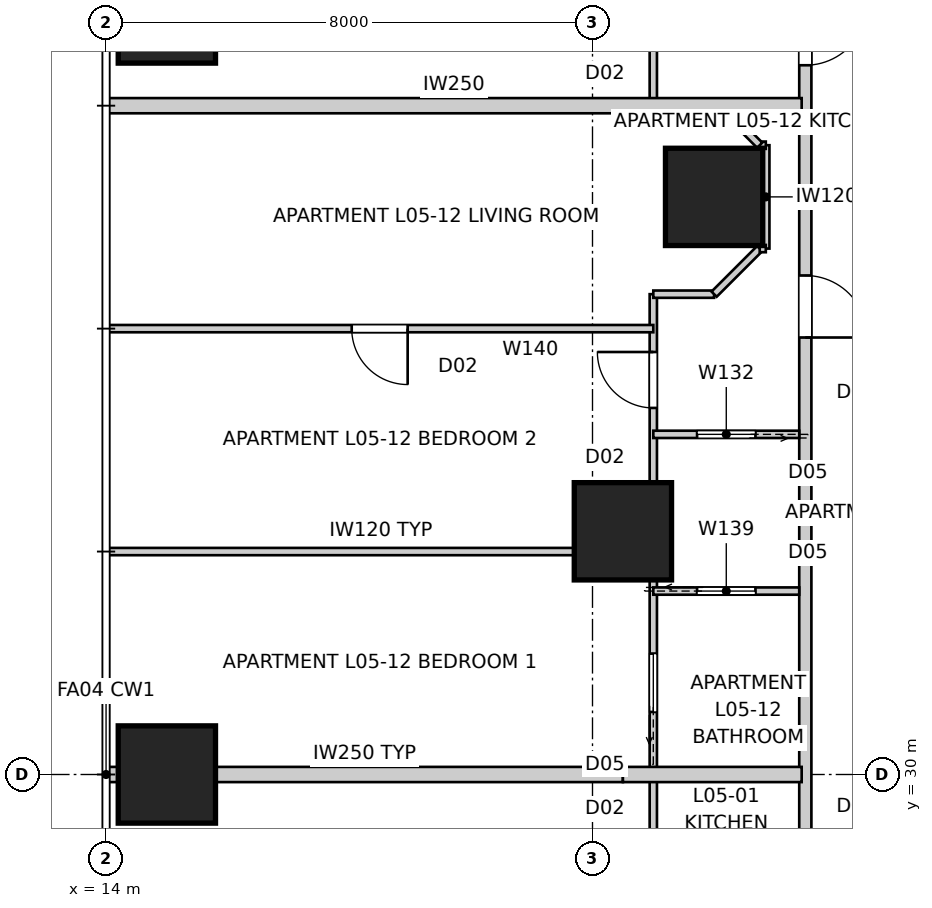
"""IFC4 building model, lengths in metres.
Left out: names, types, materials, properties, quantities, classifications, styles, units other than length and angle.
Written with IfcOpenShell. Run it as: python <this file> out.ifc"""

import sys

from ifc_helpers import new_model, si_unit, direction, frame, frame_2d, origin, origin_2d, place, context, subcontext, project, spatial, rectangle, extrude, element, fill, save


model = new_model("IFC4")
c1 = context("Model", 3, precision=1e-05, world=origin(), true_north=direction((0.0, 1.0)))
c2 = subcontext(c1, "Body", "Model", "MODEL_VIEW")
j1 = project(units=[si_unit("LENGTHUNIT", "METRE"), si_unit("PLANEANGLEUNIT", "RADIAN")], contexts=[c1])
p1 = place(None, origin())
s1 = spatial("IfcSite", under=j1, at=p1, CompositionType="ELEMENT")
p2 = place(p1, origin())
s2 = spatial("IfcBuilding", under=s1, at=p2, CompositionType="ELEMENT")
p3 = place(p2, frame((0.0, 0.0, 21.8)))
s3 = spatial("IfcBuildingStorey", under=s2, at=p3, CompositionType="ELEMENT", Elevation=21.8)
for number, where, z_axis, x_axis in (
    (1, (15.0, 42.5, 0.0), (0.0, 0.0, 1.0), (1.0, 0.0, 0.0)),
    (2, (15.0, 30.0, 0.0), (0.0, 0.0, 1.0), (1.0, 0.0, 0.0)),
    (3, (24.0, 39.5, 0.0), (0.0, 0.0, 1.0), (1.0, 0.0, 0.0)),
    (4, (22.5, 34.0, 0.0), (0.0, 0.0, 1.0), (1.0, 0.0, 0.0)),
):
    element("IfcColumn", number, at=place(p3, frame(where, z_axis=z_axis, x_axis=x_axis)), inside=s3, PredefinedType="COLUMN", context=c2, shape_type="SweptSolid", body=[
        extrude(rectangle(XDim=1.6, YDim=1.6, at=origin_2d()), origin(), (0.0, 0.0, 1.0), 3.4),
    ])
p4 = place(p3, frame((25.5, 43.7, 0.0), z_axis=(0.0, 0.0, 1.0), x_axis=(0.0, -1.0, 0.0)))
e5 = element("IfcWall", 5, at=p4, inside=s3, PredefinedType="PARTITIONING", context=c2, shape_type="SweptSolid", body=[
    extrude(rectangle(XDim=27.4, YDim=0.2, at=frame_2d((13.7, 0.0))), origin(), (0.0, 0.0, 1.0), 3.25),
])
p5 = place(p4, frame((5.493, 0.0, 0.0)))
e6 = element("IfcOpeningElement", 6, at=p5, cuts=e5, PredefinedType="OPENING", context=c2, shape_type="SweptSolid", body=[
    extrude(rectangle(XDim=1.02, YDim=2.34, at=frame_2d((0.51, 1.17))), frame((0.0, 0.11, 0.0), z_axis=(0.0, -1.0, 0.0), x_axis=(1.0, 0.0, 0.0)), (0.0, 0.0, 1.0), 0.22),
])
p6 = place(p4, frame((15.16, 0.0, 0.0)))
e7 = element("IfcOpeningElement", 7, at=p6, cuts=e5, PredefinedType="OPENING", context=c2, shape_type="SweptSolid", body=[
    extrude(rectangle(XDim=1.02, YDim=2.34, at=frame_2d((0.51, 1.17))), frame((0.0, 0.11, 0.0), z_axis=(0.0, -1.0, 0.0), x_axis=(1.0, 0.0, 0.0)), (0.0, 0.0, 1.0), 0.22),
])
p7 = place(p4, frame((25.365, 0.0, 0.0)))
e8 = element("IfcOpeningElement", 8, at=p7, cuts=e5, PredefinedType="OPENING", context=c2, shape_type="SweptSolid", body=[
    extrude(rectangle(XDim=1.02, YDim=2.34, at=frame_2d((0.51, 1.17))), frame((0.0, 0.11, 0.0), z_axis=(0.0, -1.0, 0.0), x_axis=(1.0, 0.0, 0.0)), (0.0, 0.0, 1.0), 0.22),
])
p8 = place(p4, frame((1.015, 0.0, 0.0)))
e9 = element("IfcOpeningElement", 9, at=p8, cuts=e5, PredefinedType="OPENING", context=c2, shape_type="SweptSolid", body=[
    extrude(rectangle(XDim=1.02, YDim=2.34, at=frame_2d((0.51, 1.17))), frame((0.0, 0.11, 0.0), z_axis=(0.0, -1.0, 0.0), x_axis=(1.0, 0.0, 0.0)), (0.0, 0.0, 1.0), 0.22),
])
p9 = place(p3, frame((14.0, 41.0, 0.0), z_axis=(0.0, 0.0, 1.0), x_axis=(1.0, 0.0, 0.0)))
e10 = element("IfcWall", 10, at=p9, inside=s3, PredefinedType="PARTITIONING", context=c2, shape_type="SweptSolid", body=[
    extrude(rectangle(XDim=11.44, YDim=0.25, at=frame_2d((5.72, 0.0))), origin(), (0.0, 0.0, 1.0), 3.25),
])
p10 = place(p3, frame((14.0, 30.0, 0.0), z_axis=(0.0, 0.0, 1.0), x_axis=(1.0, 0.0, 0.0)))
e11 = element("IfcWall", 11, at=p10, inside=s3, PredefinedType="PARTITIONING", context=c2, shape_type="SweptSolid", body=[
    extrude(rectangle(XDim=8.5, YDim=0.25, at=frame_2d((4.25, 0.0))), origin(), (0.0, 0.0, 1.0), 3.25),
])
p11 = place(p3, frame((22.5, 30.0, 0.0), z_axis=(0.0, 0.0, 1.0), x_axis=(1.0, 0.0, 0.0)))
e12 = element("IfcWall", 12, at=p11, inside=s3, PredefinedType="PARTITIONING", context=c2, shape_type="SweptSolid", body=[
    extrude(rectangle(XDim=2.94, YDim=0.25, at=frame_2d((1.47, 0.0))), origin(), (0.0, 0.0, 1.0), 2.796),
])
p12 = place(p3, frame((23.0, 22.667, 0.0), z_axis=(0.0, 0.0, 1.0), x_axis=(0.0, 1.0, 0.0)))
e13 = element("IfcWall", 13, at=p12, inside=s3, PredefinedType="PARTITIONING", context=c2, shape_type="SweptSolid", body=[
    extrude(rectangle(XDim=15.233, YDim=0.12, at=frame_2d((7.617, 0.0))), origin(), (0.0, 0.0, 1.0), 2.549),
])
p13 = place(p12, frame((13.362, 0.0, 0.0)))
e14 = element("IfcOpeningElement", 14, at=p13, cuts=e13, PredefinedType="OPENING", context=c2, shape_type="SweptSolid", body=[
    extrude(rectangle(XDim=0.92, YDim=2.34, at=frame_2d((0.46, 1.17))), frame((0.0, 0.07, 0.0), z_axis=(0.0, -1.0, 0.0), x_axis=(1.0, 0.0, 0.0)), (0.0, 0.0, 1.0), 0.14),
])
p14 = place(p12, frame((5.015, 0.0, 0.0)))
e15 = element("IfcOpeningElement", 15, at=p14, cuts=e13, PredefinedType="OPENING", context=c2, shape_type="SweptSolid", body=[
    extrude(rectangle(XDim=0.92, YDim=2.34, at=frame_2d((0.46, 1.17))), frame((0.0, 0.07, 0.0), z_axis=(0.0, -1.0, 0.0), x_axis=(1.0, 0.0, 0.0)), (0.0, 0.0, 1.0), 0.14),
])
p15 = place(p12, frame((8.362, 0.0, 0.0)))
e16 = element("IfcOpeningElement", 16, at=p15, cuts=e13, PredefinedType="OPENING", context=c2, shape_type="SweptSolid", body=[
    extrude(rectangle(XDim=0.96, YDim=2.1, at=frame_2d((0.48, 1.05))), frame((0.0, 0.07, 0.0), z_axis=(0.0, -1.0, 0.0), x_axis=(1.0, 0.0, 0.0)), (0.0, 0.0, 1.0), 0.14),
])
p16 = place(p3, frame((23.0, 41.0, 0.0), z_axis=(0.0, 0.0, 1.0), x_axis=(0.0, 1.0, 0.0)))
e17 = element("IfcWall", 17, at=p16, inside=s3, PredefinedType="PARTITIONING", context=c2, shape_type="SweptSolid", body=[
    extrude(rectangle(XDim=6.0, YDim=0.12, at=frame_2d((3.0, 0.0))), origin(), (0.0, 0.0, 1.0), 3.25),
])
p17 = place(p16, frame((1.351, 0.0, 0.0)))
e18 = element("IfcOpeningElement", 18, at=p17, cuts=e17, PredefinedType="OPENING", context=c2, shape_type="SweptSolid", body=[
    extrude(rectangle(XDim=0.92, YDim=2.34, at=frame_2d((0.46, 1.17))), frame((0.0, 0.07, 0.0), z_axis=(0.0, -1.0, 0.0), x_axis=(1.0, 0.0, 0.0)), (0.0, 0.0, 1.0), 0.14),
])
p18 = place(p3, frame((25.4, 35.594, 0.0), z_axis=(0.0, 0.0, 1.0), x_axis=(-1.0, 0.0, 0.0)))
e19 = element("IfcWall", 19, at=p18, inside=s3, PredefinedType="PARTITIONING", context=c2, shape_type="SweptSolid", body=[
    extrude(rectangle(XDim=2.4, YDim=0.12, at=frame_2d((1.2, 0.0))), origin(), (0.0, 0.0, 1.0), 3.25),
])
p19 = place(p18, frame((0.72, 0.0, 0.0)))
e20 = element("IfcOpeningElement", 20, at=p19, cuts=e19, PredefinedType="OPENING", context=c2, shape_type="SweptSolid", body=[
    extrude(rectangle(XDim=0.96, YDim=2.1, at=frame_2d((0.48, 1.05))), frame((0.0, 0.07, 0.0), z_axis=(0.0, -1.0, 0.0), x_axis=(1.0, 0.0, 0.0)), (0.0, 0.0, 1.0), 0.14),
])
p20 = place(p3, frame((23.0, 37.9, 0.0), z_axis=(0.0, 0.0, 1.0), x_axis=(1.0, 0.0, 0.0)))
e21 = element("IfcWall", 21, at=p20, inside=s3, PredefinedType="PARTITIONING", context=c2, shape_type="SweptSolid", body=[
    extrude(rectangle(XDim=1.0, YDim=0.12, at=frame_2d((0.5, 0.0))), origin(), (0.0, 0.0, 1.0), 3.25),
])
p21 = place(p3, frame((24.0, 37.9, 0.0), z_axis=(0.0, 0.0, 1.0), x_axis=(0.707106781187, 0.707106781187, 0.0)))
e22 = element("IfcWall", 22, at=p21, inside=s3, PredefinedType="PARTITIONING", context=c2, shape_type="SweptSolid", body=[
    extrude(rectangle(XDim=1.061, YDim=0.12, at=frame_2d((0.53, 0.0))), origin(), (0.0, 0.0, 1.0), 3.25),
])
p22 = place(p3, frame((24.85, 38.65, 0.0), z_axis=(0.0, 0.0, 1.0), x_axis=(0.0, 1.0, 0.0)))
e23 = element("IfcWall", 23, at=p22, inside=s3, PredefinedType="PARTITIONING", context=c2, shape_type="SweptSolid", body=[
    extrude(rectangle(XDim=1.7, YDim=0.12, at=frame_2d((0.85, 0.0))), origin(), (0.0, 0.0, 1.0), 3.25),
])
p23 = place(p3, frame((24.75, 40.35, 0.0), z_axis=(0.0, 0.0, 1.0), x_axis=(-0.707106781187, 0.707106781187, 0.0)))
e24 = element("IfcWall", 24, at=p23, inside=s3, PredefinedType="PARTITIONING", context=c2, shape_type="SweptSolid", body=[
    extrude(rectangle(XDim=0.919, YDim=0.12, at=frame_2d((0.459, 0.0))), origin(), (0.0, 0.0, 1.0), 3.25),
])
p24 = place(p3, frame((23.0, 33.017, 0.0), z_axis=(0.0, 0.0, 1.0), x_axis=(1.0, 0.0, 0.0)))
e25 = element("IfcWall", 25, at=p24, inside=s3, PredefinedType="PARTITIONING", context=c2, shape_type="SweptSolid", body=[
    extrude(rectangle(XDim=2.4, YDim=0.12, at=frame_2d((1.2, 0.0))), origin(), (0.0, 0.0, 1.0), 3.25),
])
p25 = place(p24, frame((0.72, 0.0, 0.0)))
e26 = element("IfcOpeningElement", 26, at=p25, cuts=e25, PredefinedType="OPENING", context=c2, shape_type="SweptSolid", body=[
    extrude(rectangle(XDim=0.96, YDim=2.1, at=frame_2d((0.48, 1.05))), frame((0.0, 0.07, 0.0), z_axis=(0.0, -1.0, 0.0), x_axis=(1.0, 0.0, 0.0)), (0.0, 0.0, 1.0), 0.14),
])
p26 = place(p3, frame((23.0, 37.333, 0.0), z_axis=(0.0, 0.0, 1.0), x_axis=(-1.0, 0.0, 0.0)))
e27 = element("IfcWall", 27, at=p26, inside=s3, PredefinedType="PARTITIONING", context=c2, shape_type="SweptSolid", body=[
    extrude(rectangle(XDim=8.96, YDim=0.12, at=frame_2d((4.48, 0.0))), origin(), (0.0, 0.0, 1.0), 3.25),
])
p27 = place(p26, frame((4.04, 0.0, 0.0)))
e28 = element("IfcOpeningElement", 28, at=p27, cuts=e27, PredefinedType="OPENING", context=c2, shape_type="SweptSolid", body=[
    extrude(rectangle(XDim=0.92, YDim=2.34, at=frame_2d((0.46, 1.17))), frame((0.0, 0.07, 0.0), z_axis=(0.0, -1.0, 0.0), x_axis=(1.0, 0.0, 0.0)), (0.0, 0.0, 1.0), 0.14),
])
p28 = place(p3, frame((14.04, 33.667, 0.0), z_axis=(0.0, 0.0, 1.0), x_axis=(1.0, 0.0, 0.0)))
e29 = element("IfcWall", 29, at=p28, inside=s3, PredefinedType="PARTITIONING", context=c2, shape_type="SweptSolid", body=[
    extrude(rectangle(XDim=8.96, YDim=0.12, at=frame_2d((4.48, 0.0))), origin(), (0.0, 0.0, 1.0), 3.25),
])
for number, where, z_axis, x_axis in (
    (30, (24.85, 38.65, 0.0), (0.0, 0.0, 1.0), (-1.0, 0.0, 0.0)),
    (31, (24.85, 40.35, 0.0), (0.0, 0.0, 1.0), (-1.0, 0.0, 0.0)),
):
    element("IfcWall", number, at=place(p3, frame(where, z_axis=z_axis, x_axis=x_axis)), inside=s3, PredefinedType="PARTITIONING", context=c2, shape_type="SweptSolid", body=[
        extrude(rectangle(XDim=0.1, YDim=0.12, at=frame_2d((0.05, 0.0))), origin(), (0.0, 0.0, 1.0), 3.25),
    ])
p29 = place(p5, origin())
e32 = element("IfcDoor", 32, at=p29, inside=s3, OperationType="SINGLE_SWING_RIGHT", PredefinedType="DOOR", context=c2, shape_type="SweptSolid", body=[
    extrude(rectangle(XDim=1.02, YDim=2.34, at=frame_2d((0.51, 1.17))), frame((0.0, 0.025, 0.0), z_axis=(0.0, -1.0, 0.0), x_axis=(1.0, 0.0, 0.0)), (0.0, 0.0, 1.0), 0.05),
])
fill(e6, e32)
p30 = place(p8, origin())
e33 = element("IfcDoor", 33, at=p30, inside=s3, OperationType="SINGLE_SWING_LEFT", PredefinedType="DOOR", context=c2, shape_type="SweptSolid", body=[
    extrude(rectangle(XDim=1.02, YDim=2.34, at=frame_2d((0.51, 1.17))), frame((0.0, 0.025, 0.0), z_axis=(0.0, -1.0, 0.0), x_axis=(1.0, 0.0, 0.0)), (0.0, 0.0, 1.0), 0.05),
])
fill(e9, e33)
p31 = place(p19, origin())
e34 = element("IfcDoor", 34, at=p31, inside=s3, OperationType="SLIDING_TO_LEFT", PredefinedType="DOOR", context=c2, shape_type="SweptSolid", body=[
    extrude(rectangle(XDim=0.96, YDim=2.1, at=frame_2d((0.48, 1.05))), frame((0.0, 0.025, 0.0), z_axis=(0.0, -1.0, 0.0), x_axis=(1.0, 0.0, 0.0)), (0.0, 0.0, 1.0), 0.05),
])
fill(e20, e34)
p32 = place(p13, origin())
e35 = element("IfcDoor", 35, at=p32, inside=s3, OperationType="SINGLE_SWING_RIGHT", PredefinedType="DOOR", context=c2, shape_type="SweptSolid", body=[
    extrude(rectangle(XDim=0.92, YDim=2.34, at=frame_2d((0.46, 1.17))), frame((0.0, 0.025, 0.0), z_axis=(0.0, -1.0, 0.0), x_axis=(1.0, 0.0, 0.0)), (0.0, 0.0, 1.0), 0.05),
])
fill(e14, e35)
p33 = place(p25, origin())
e36 = element("IfcDoor", 36, at=p33, inside=s3, OperationType="SLIDING_TO_LEFT", PredefinedType="DOOR", context=c2, shape_type="SweptSolid", body=[
    extrude(rectangle(XDim=0.96, YDim=2.1, at=frame_2d((0.48, 1.05))), frame((0.0, 0.025, 0.0), z_axis=(0.0, -1.0, 0.0), x_axis=(1.0, 0.0, 0.0)), (0.0, 0.0, 1.0), 0.05),
])
fill(e26, e36)
p34 = place(p15, origin())
e37 = element("IfcDoor", 37, at=p34, inside=s3, OperationType="SLIDING_TO_LEFT", PredefinedType="DOOR", context=c2, shape_type="SweptSolid", body=[
    extrude(rectangle(XDim=0.96, YDim=2.1, at=frame_2d((0.48, 1.05))), frame((0.0, 0.025, 0.0), z_axis=(0.0, -1.0, 0.0), x_axis=(1.0, 0.0, 0.0)), (0.0, 0.0, 1.0), 0.05),
])
fill(e16, e37)
p35 = place(p27, origin())
e38 = element("IfcDoor", 38, at=p35, inside=s3, OperationType="SINGLE_SWING_LEFT", PredefinedType="DOOR", context=c2, shape_type="SweptSolid", body=[
    extrude(rectangle(XDim=0.92, YDim=2.34, at=frame_2d((0.46, 1.17))), frame((0.0, 0.025, 0.0), z_axis=(0.0, -1.0, 0.0), x_axis=(1.0, 0.0, 0.0)), (0.0, 0.0, 1.0), 0.05),
])
fill(e28, e38)
save(model, sys.argv[1])
